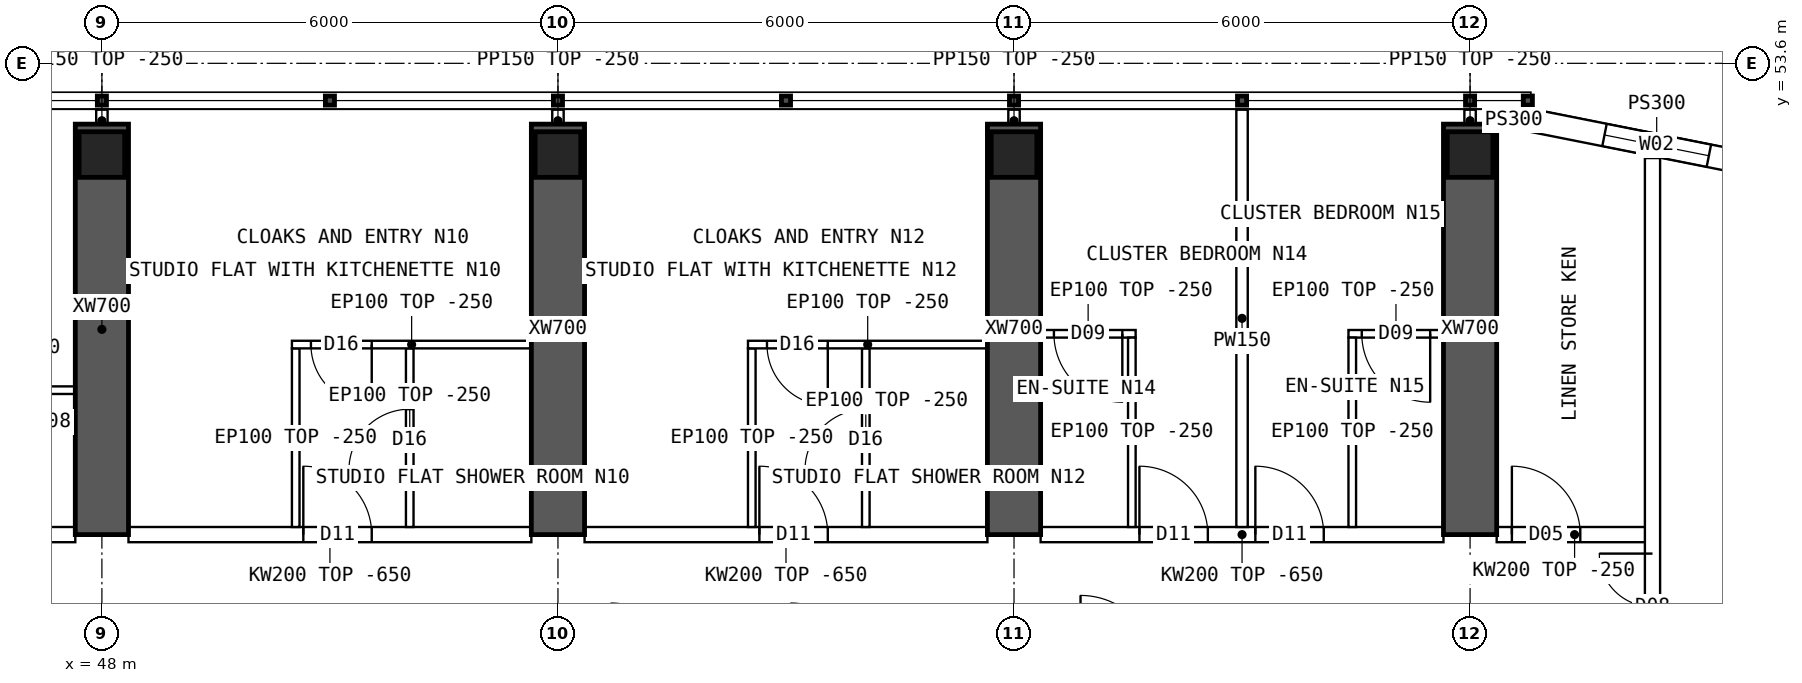
"""IFC4 building model, lengths in metres.
Left out: names, types, materials, properties, quantities, classifications, styles, units other than length and angle.
Written with IfcOpenShell. Run it as: python <this file> out.ifc"""

import sys

from ifc_helpers import new_model, si_unit, direction, frame, frame_2d, origin, origin_2d, place, context, subcontext, project, spatial, polyline, rectangle, hollow_rectangle, outline, extrude, element, fill, save


model = new_model("IFC4")
c1 = context("Model", 3, precision=1e-05, world=origin(), true_north=direction((0.0, 1.0)))
c2 = subcontext(c1, "Body", "Model", "MODEL_VIEW")
j1 = project(units=[si_unit("LENGTHUNIT", "METRE"), si_unit("PLANEANGLEUNIT", "RADIAN")], contexts=[c1])
p1 = place(None, origin())
s1 = spatial("IfcSite", under=j1, at=p1, CompositionType="ELEMENT")
p2 = place(p1, origin())
s2 = spatial("IfcBuilding", under=s1, at=p2, CompositionType="ELEMENT")
p3 = place(p2, frame((0.0, 0.0, 250.3)))
s3 = spatial("IfcBuildingStorey", under=s2, at=p3, CompositionType="ELEMENT", Elevation=250.3)
for number, where, z_axis, x_axis in (
    (1, (48.0, 52.4, 0.0), (0.0, 0.0, 1.0), (1.0, 0.0, 0.0)),
    (2, (54.0, 52.4, 0.0), (0.0, 0.0, 1.0), (1.0, 0.0, 0.0)),
    (3, (60.0, 52.4, 0.0), (0.0, 0.0, 1.0), (1.0, 0.0, 0.0)),
    (4, (66.0, 52.4, 0.0), (0.0, 0.0, 1.0), (1.0, 0.0, 0.0)),
):
    element("IfcColumn", number, at=place(p3, frame(where, z_axis=z_axis, x_axis=x_axis)), inside=s3, PredefinedType="COLUMN", context=c2, shape_type="SweptSolid", body=[
        extrude(hollow_rectangle(XDim=0.6, YDim=0.6, WallThickness=0.06, at=origin_2d()), origin(), (0.0, 0.0, 1.0), 3.75),
    ])
for number, where, z_axis, x_axis in (
    (5, (48.0, 47.4, 0.0), (0.0, 0.0, 1.0), (0.0, 1.0, 0.0)),
    (6, (54.0, 47.4, 0.0), (0.0, 0.0, 1.0), (0.0, 1.0, 0.0)),
    (7, (60.0, 47.4, 0.0), (0.0, 0.0, 1.0), (0.0, 1.0, 0.0)),
    (8, (66.0, 47.4, 0.0), (0.0, 0.0, 1.0), (0.0, 1.0, 0.0)),
):
    element("IfcWall", number, at=place(p3, frame(where, z_axis=z_axis, x_axis=x_axis)), inside=s3, PredefinedType="SHEAR", context=c2, shape_type="SweptSolid", body=[
        extrude(rectangle(XDim=5.4, YDim=0.7, at=frame_2d((2.7, 0.0))), origin(), (0.0, 0.0, 1.0), 3.75),
    ])
p4 = place(p3, frame((70.11, 52.192, 0.0), z_axis=(0.0, 0.0, 1.0), x_axis=(-0.98078325777, 0.195100490205, 0.0)))
e9 = element("IfcWall", 9, at=p4, inside=s3, PredefinedType="SOLIDWALL", context=c2, shape_type="SweptSolid", body=[
    extrude(outline(polyline([(-0.03, -0.15), (3.405, -0.15), (3.345, 0.15), (0.03, 0.15), (-0.03, -0.15)])), origin(), (0.0, 0.0, 1.0), 3.5),
])
p5 = place(p4, frame((0.988, 0.0, 0.9)))
e10 = element("IfcOpeningElement", 10, at=p5, cuts=e9, PredefinedType="OPENING", context=c2, shape_type="SweptSolid", body=[
    extrude(rectangle(XDim=1.4, YDim=1.8, at=frame_2d((0.7, 0.9))), frame((0.0, 0.16, 0.0), z_axis=(0.0, -1.0, 0.0), x_axis=(1.0, 0.0, 0.0)), (0.0, 0.0, 1.0), 0.32),
])
p6 = place(p3, frame((66.8, 52.85, 0.0), z_axis=(0.0, 0.0, 1.0), x_axis=(-1.0, 0.0, 0.0)))
e11 = element("IfcWall", 11, at=p6, inside=s3, PredefinedType="SOLIDWALL", context=c2, shape_type="SweptSolid", body=[
    extrude(rectangle(XDim=0.45, YDim=0.3, at=frame_2d((0.225, 0.0))), origin(), (0.0, 0.0, 1.0), 3.5),
])
p7 = place(p3, frame((42.35, 47.4, 0.0), z_axis=(0.0, 0.0, 1.0), x_axis=(1.0, 0.0, 0.0)))
e12 = element("IfcWall", 12, at=p7, inside=s3, PredefinedType="SOLIDWALL", context=c2, shape_type="SweptSolid", body=[
    extrude(outline(polyline([(0.0, 0.0), (5.3, 0.0), (5.3, 3.1), (0.0, 3.1), (0.0, 0.0)])), frame((0.0, 0.1, 0.0), z_axis=(0.0, -1.0, 0.0), x_axis=(1.0, 0.0, 0.0)), (0.0, 0.0, 1.0), 0.2),
])
p8 = place(p7, frame((0.1, 0.0, 0.0)))
e13 = element("IfcOpeningElement", 13, at=p8, cuts=e12, PredefinedType="OPENING", context=c2, shape_type="SweptSolid", body=[
    extrude(rectangle(XDim=0.9, YDim=2.1, at=frame_2d((0.45, 1.05))), frame((0.0, 0.11, 0.0), z_axis=(0.0, -1.0, 0.0), x_axis=(1.0, 0.0, 0.0)), (0.0, 0.0, 1.0), 0.22),
])
p9 = place(p3, frame((48.35, 47.4, 0.0), z_axis=(0.0, 0.0, 1.0), x_axis=(1.0, 0.0, 0.0)))
e14 = element("IfcWall", 14, at=p9, inside=s3, PredefinedType="SOLIDWALL", context=c2, shape_type="SweptSolid", body=[
    extrude(outline(polyline([(0.0, 0.0), (5.3, 0.0), (5.3, 3.1), (0.0, 3.1), (0.0, 0.0)])), frame((0.0, 0.1, 0.0), z_axis=(0.0, -1.0, 0.0), x_axis=(1.0, 0.0, 0.0)), (0.0, 0.0, 1.0), 0.2),
])
p10 = place(p9, frame((2.3, 0.0, 0.0)))
e15 = element("IfcOpeningElement", 15, at=p10, cuts=e14, PredefinedType="OPENING", context=c2, shape_type="SweptSolid", body=[
    extrude(rectangle(XDim=0.9, YDim=2.1, at=frame_2d((0.45, 1.05))), frame((0.0, 0.11, 0.0), z_axis=(0.0, -1.0, 0.0), x_axis=(1.0, 0.0, 0.0)), (0.0, 0.0, 1.0), 0.22),
])
p11 = place(p3, frame((54.35, 47.4, 0.0), z_axis=(0.0, 0.0, 1.0), x_axis=(1.0, 0.0, 0.0)))
e16 = element("IfcWall", 16, at=p11, inside=s3, PredefinedType="SOLIDWALL", context=c2, shape_type="SweptSolid", body=[
    extrude(outline(polyline([(0.0, 0.0), (5.3, 0.0), (5.3, 3.1), (0.0, 3.1), (0.0, 0.0)])), frame((0.0, 0.1, 0.0), z_axis=(0.0, -1.0, 0.0), x_axis=(1.0, 0.0, 0.0)), (0.0, 0.0, 1.0), 0.2),
])
p12 = place(p11, frame((2.3, 0.0, 0.0)))
e17 = element("IfcOpeningElement", 17, at=p12, cuts=e16, PredefinedType="OPENING", context=c2, shape_type="SweptSolid", body=[
    extrude(rectangle(XDim=0.9, YDim=2.1, at=frame_2d((0.45, 1.05))), frame((0.0, 0.11, 0.0), z_axis=(0.0, -1.0, 0.0), x_axis=(1.0, 0.0, 0.0)), (0.0, 0.0, 1.0), 0.22),
])
p13 = place(p3, frame((60.35, 47.4, 0.0), z_axis=(0.0, 0.0, 1.0), x_axis=(1.0, 0.0, 0.0)))
e18 = element("IfcWall", 18, at=p13, inside=s3, PredefinedType="SOLIDWALL", context=c2, shape_type="SweptSolid", body=[
    extrude(outline(polyline([(0.0, 0.0), (5.3, 0.0), (5.3, 3.1), (0.0, 3.1), (0.0, 0.0)])), frame((0.0, 0.1, 0.0), z_axis=(0.0, -1.0, 0.0), x_axis=(1.0, 0.0, 0.0)), (0.0, 0.0, 1.0), 0.2),
])
p14 = place(p13, frame((1.3, 0.0, 0.0)))
e19 = element("IfcOpeningElement", 19, at=p14, cuts=e18, PredefinedType="OPENING", context=c2, shape_type="SweptSolid", body=[
    extrude(rectangle(XDim=0.9, YDim=2.1, at=frame_2d((0.45, 1.05))), frame((0.0, 0.11, 0.0), z_axis=(0.0, -1.0, 0.0), x_axis=(1.0, 0.0, 0.0)), (0.0, 0.0, 1.0), 0.22),
])
p15 = place(p13, frame((2.825, 0.0, 0.0)))
e20 = element("IfcOpeningElement", 20, at=p15, cuts=e18, PredefinedType="OPENING", context=c2, shape_type="SweptSolid", body=[
    extrude(rectangle(XDim=0.9, YDim=2.1, at=frame_2d((0.45, 1.05))), frame((0.0, 0.11, 0.0), z_axis=(0.0, -1.0, 0.0), x_axis=(1.0, 0.0, 0.0)), (0.0, 0.0, 1.0), 0.22),
])
p16 = place(p3, frame((66.35, 47.4, 0.0), z_axis=(0.0, 0.0, 1.0), x_axis=(1.0, 0.0, 0.0)))
e21 = element("IfcWall", 21, at=p16, inside=s3, PredefinedType="SOLIDWALL", context=c2, shape_type="SweptSolid", body=[
    extrude(rectangle(XDim=2.05, YDim=0.2, at=frame_2d((1.025, 0.0))), origin(), (0.0, 0.0, 1.0), 3.5),
])
p17 = place(p16, frame((0.2, 0.0, 0.0)))
e22 = element("IfcOpeningElement", 22, at=p17, cuts=e21, PredefinedType="OPENING", context=c2, shape_type="SweptSolid", body=[
    extrude(rectangle(XDim=0.9, YDim=2.1, at=frame_2d((0.45, 1.05))), frame((0.0, 0.11, 0.0), z_axis=(0.0, -1.0, 0.0), x_axis=(1.0, 0.0, 0.0)), (0.0, 0.0, 1.0), 0.22),
])
p18 = place(p3, frame((45.1, 49.3, 0.0), z_axis=(0.0, 0.0, 1.0), x_axis=(1.0, 0.0, 0.0)))
e23 = element("IfcWall", 23, at=p18, inside=s3, PredefinedType="PARTITIONING", context=c2, shape_type="SweptSolid", body=[
    extrude(rectangle(XDim=2.55, YDim=0.1, at=frame_2d((1.275, 0.0))), origin(), (0.0, 0.0, 1.0), 3.5),
])
p19 = place(p18, frame((0.825, 0.0, 0.0)))
e24 = element("IfcOpeningElement", 24, at=p19, cuts=e23, PredefinedType="OPENING", context=c2, shape_type="SweptSolid", body=[
    extrude(rectangle(XDim=0.9, YDim=2.1, at=frame_2d((0.45, 1.05))), frame((0.0, 0.06, 0.0), z_axis=(0.0, -1.0, 0.0), x_axis=(1.0, 0.0, 0.0)), (0.0, 0.0, 1.0), 0.12),
])
p20 = place(p3, frame((50.5, 49.9, 0.0), z_axis=(0.0, 0.0, 1.0), x_axis=(1.0, 0.0, 0.0)))
e25 = element("IfcWall", 25, at=p20, inside=s3, PredefinedType="PARTITIONING", context=c2, shape_type="SweptSolid", body=[
    extrude(rectangle(XDim=3.15, YDim=0.1, at=frame_2d((1.575, 0.0))), origin(), (0.0, 0.0, 1.0), 3.5),
])
p21 = place(p20, frame((0.25, 0.0, 0.0)))
e26 = element("IfcOpeningElement", 26, at=p21, cuts=e25, PredefinedType="OPENING", context=c2, shape_type="SweptSolid", body=[
    extrude(rectangle(XDim=0.8, YDim=2.1, at=frame_2d((0.4, 1.05))), frame((0.0, 0.06, 0.0), z_axis=(0.0, -1.0, 0.0), x_axis=(1.0, 0.0, 0.0)), (0.0, 0.0, 1.0), 0.12),
])
p22 = place(p3, frame((50.55, 49.85, 0.0), z_axis=(0.0, 0.0, 1.0), x_axis=(0.0, -1.0, 0.0)))
e27 = element("IfcWall", 27, at=p22, inside=s3, PredefinedType="PARTITIONING", context=c2, shape_type="SweptSolid", body=[
    extrude(outline(polyline([(0.0, 0.0), (2.35, 0.0), (2.35, 3.1), (2.302, 3.1), (2.3, 3.5), (0.0, 3.5), (0.0, 0.0)])), frame((0.0, 0.05, 0.0), z_axis=(0.0, -1.0, 0.0), x_axis=(1.0, 0.0, 0.0)), (0.0, 0.0, 1.0), 0.1),
])
p23 = place(p3, frame((52.05, 49.85, 0.0), z_axis=(0.0, 0.0, 1.0), x_axis=(0.0, -1.0, 0.0)))
e28 = element("IfcWall", 28, at=p23, inside=s3, PredefinedType="PARTITIONING", context=c2, shape_type="SweptSolid", body=[
    extrude(outline(polyline([(0.0, 0.0), (2.35, 0.0), (2.35, 3.1), (2.302, 3.1), (2.3, 3.5), (0.0, 3.5), (0.0, 0.0)])), frame((0.0, 0.05, 0.0), z_axis=(0.0, -1.0, 0.0), x_axis=(1.0, 0.0, 0.0)), (0.0, 0.0, 1.0), 0.1),
])
p24 = place(p23, frame((0.8, 0.0, 0.0)))
e29 = element("IfcOpeningElement", 29, at=p24, cuts=e28, PredefinedType="OPENING", context=c2, shape_type="SweptSolid", body=[
    extrude(rectangle(XDim=0.8, YDim=2.1, at=frame_2d((0.4, 1.05))), frame((0.0, 0.06, 0.0), z_axis=(0.0, -1.0, 0.0), x_axis=(1.0, 0.0, 0.0)), (0.0, 0.0, 1.0), 0.12),
])
p25 = place(p3, frame((56.5, 49.9, 0.0), z_axis=(0.0, 0.0, 1.0), x_axis=(1.0, 0.0, 0.0)))
e30 = element("IfcWall", 30, at=p25, inside=s3, PredefinedType="PARTITIONING", context=c2, shape_type="SweptSolid", body=[
    extrude(rectangle(XDim=3.15, YDim=0.1, at=frame_2d((1.575, 0.0))), origin(), (0.0, 0.0, 1.0), 3.5),
])
p26 = place(p25, frame((0.25, 0.0, 0.0)))
e31 = element("IfcOpeningElement", 31, at=p26, cuts=e30, PredefinedType="OPENING", context=c2, shape_type="SweptSolid", body=[
    extrude(rectangle(XDim=0.8, YDim=2.1, at=frame_2d((0.4, 1.05))), frame((0.0, 0.06, 0.0), z_axis=(0.0, -1.0, 0.0), x_axis=(1.0, 0.0, 0.0)), (0.0, 0.0, 1.0), 0.12),
])
p27 = place(p3, frame((56.55, 49.85, 0.0), z_axis=(0.0, 0.0, 1.0), x_axis=(0.0, -1.0, 0.0)))
e32 = element("IfcWall", 32, at=p27, inside=s3, PredefinedType="PARTITIONING", context=c2, shape_type="SweptSolid", body=[
    extrude(outline(polyline([(0.0, 0.0), (2.35, 0.0), (2.35, 3.1), (2.302, 3.1), (2.3, 3.5), (0.0, 3.5), (0.0, 0.0)])), frame((0.0, 0.05, 0.0), z_axis=(0.0, -1.0, 0.0), x_axis=(1.0, 0.0, 0.0)), (0.0, 0.0, 1.0), 0.1),
])
p28 = place(p3, frame((58.05, 49.85, 0.0), z_axis=(0.0, 0.0, 1.0), x_axis=(0.0, -1.0, 0.0)))
e33 = element("IfcWall", 33, at=p28, inside=s3, PredefinedType="PARTITIONING", context=c2, shape_type="SweptSolid", body=[
    extrude(outline(polyline([(0.0, 0.0), (2.35, 0.0), (2.35, 3.1), (2.302, 3.1), (2.3, 3.5), (0.0, 3.5), (0.0, 0.0)])), frame((0.0, 0.05, 0.0), z_axis=(0.0, -1.0, 0.0), x_axis=(1.0, 0.0, 0.0)), (0.0, 0.0, 1.0), 0.1),
])
p29 = place(p28, frame((0.8, 0.0, 0.0)))
e34 = element("IfcOpeningElement", 34, at=p29, cuts=e33, PredefinedType="OPENING", context=c2, shape_type="SweptSolid", body=[
    extrude(rectangle(XDim=0.8, YDim=2.1, at=frame_2d((0.4, 1.05))), frame((0.0, 0.06, 0.0), z_axis=(0.0, -1.0, 0.0), x_axis=(1.0, 0.0, 0.0)), (0.0, 0.0, 1.0), 0.12),
])
p30 = place(p3, frame((63.0, 52.99, 0.0), z_axis=(0.0, 0.0, 1.0), x_axis=(0.0, -1.0, 0.0)))
e35 = element("IfcWall", 35, at=p30, inside=s3, PredefinedType="PARTITIONING", context=c2, shape_type="SweptSolid", body=[
    extrude(outline(polyline([(0.0, 0.0), (5.49, 0.0), (5.49, 3.1), (5.442, 3.1), (5.44, 3.5), (0.792, 3.5), (0.79, 3.1), (0.392, 3.1), (0.39, 3.5), (0.0, 3.5), (0.0, 0.0)])), frame((0.0, 0.075, 0.0), z_axis=(0.0, -1.0, 0.0), x_axis=(1.0, 0.0, 0.0)), (0.0, 0.0, 1.0), 0.15),
])
p31 = place(p3, frame((60.35, 50.042, 0.0), z_axis=(0.0, 0.0, 1.0), x_axis=(1.0, 0.0, 0.0)))
e36 = element("IfcWall", 36, at=p31, inside=s3, PredefinedType="PARTITIONING", context=c2, shape_type="SweptSolid", body=[
    extrude(rectangle(XDim=1.25, YDim=0.1, at=frame_2d((0.625, 0.0))), origin(), (0.0, 0.0, 1.0), 3.5),
])
p32 = place(p31, frame((0.175, 0.0, 0.0)))
e37 = element("IfcOpeningElement", 37, at=p32, cuts=e36, PredefinedType="OPENING", context=c2, shape_type="SweptSolid", body=[
    extrude(rectangle(XDim=0.9, YDim=2.1, at=frame_2d((0.45, 1.05))), frame((0.0, 0.06, 0.0), z_axis=(0.0, -1.0, 0.0), x_axis=(1.0, 0.0, 0.0)), (0.0, 0.0, 1.0), 0.12),
])
p33 = place(p3, frame((61.55, 49.992, 0.0), z_axis=(0.0, 0.0, 1.0), x_axis=(0.0, -1.0, 0.0)))
e38 = element("IfcWall", 38, at=p33, inside=s3, PredefinedType="PARTITIONING", context=c2, shape_type="SweptSolid", body=[
    extrude(outline(polyline([(0.0, 0.0), (2.492, 0.0), (2.492, 3.1), (2.444, 3.1), (2.442, 3.5), (0.0, 3.5), (0.0, 0.0)])), frame((0.0, 0.05, 0.0), z_axis=(0.0, -1.0, 0.0), x_axis=(1.0, 0.0, 0.0)), (0.0, 0.0, 1.0), 0.1),
])
p34 = place(p3, frame((64.4, 50.042, 0.0), z_axis=(0.0, 0.0, 1.0), x_axis=(1.0, 0.0, 0.0)))
e39 = element("IfcWall", 39, at=p34, inside=s3, PredefinedType="PARTITIONING", context=c2, shape_type="SweptSolid", body=[
    extrude(rectangle(XDim=1.25, YDim=0.1, at=frame_2d((0.625, 0.0))), origin(), (0.0, 0.0, 1.0), 3.5),
])
p35 = place(p34, frame((0.175, 0.0, 0.0)))
e40 = element("IfcOpeningElement", 40, at=p35, cuts=e39, PredefinedType="OPENING", context=c2, shape_type="SweptSolid", body=[
    extrude(rectangle(XDim=0.9, YDim=2.1, at=frame_2d((0.45, 1.05))), frame((0.0, 0.06, 0.0), z_axis=(0.0, -1.0, 0.0), x_axis=(1.0, 0.0, 0.0)), (0.0, 0.0, 1.0), 0.12),
])
p36 = place(p3, frame((64.45, 49.992, 0.0), z_axis=(0.0, 0.0, 1.0), x_axis=(0.0, -1.0, 0.0)))
e41 = element("IfcWall", 41, at=p36, inside=s3, PredefinedType="PARTITIONING", context=c2, shape_type="SweptSolid", body=[
    extrude(outline(polyline([(0.0, 0.0), (2.492, 0.0), (2.492, 3.1), (2.444, 3.1), (2.442, 3.5), (0.0, 3.5), (0.0, 0.0)])), frame((0.0, 0.05, 0.0), z_axis=(0.0, -1.0, 0.0), x_axis=(1.0, 0.0, 0.0)), (0.0, 0.0, 1.0), 0.1),
])
p37 = place(p3, frame((68.4, 11.646, 0.0), z_axis=(0.0, 0.0, 1.0), x_axis=(0.0, 1.0, 0.0)))
e42 = element("IfcWall", 42, at=p37, inside=s3, PredefinedType="SOLIDWALL", context=c2, shape_type="SweptSolid", body=[
    extrude(rectangle(XDim=40.708, YDim=0.2, at=frame_2d((20.354, 0.0))), origin(), (0.0, 0.0, 1.0), 3.5),
])
p38 = place(p37, frame((5.104, 0.0, 0.0)))
e43 = element("IfcOpeningElement", 43, at=p38, cuts=e42, PredefinedType="OPENING", context=c2, shape_type="SweptSolid", body=[
    extrude(rectangle(XDim=1.4, YDim=2.1, at=frame_2d((0.7, 1.05))), frame((0.0, 0.11, 0.0), z_axis=(0.0, -1.0, 0.0), x_axis=(1.0, 0.0, 0.0)), (0.0, 0.0, 1.0), 0.22),
])
p39 = place(p37, frame((34.104, 0.0, 0.0)))
e44 = element("IfcOpeningElement", 44, at=p39, cuts=e42, PredefinedType="OPENING", context=c2, shape_type="SweptSolid", body=[
    extrude(rectangle(XDim=1.4, YDim=2.1, at=frame_2d((0.7, 1.05))), frame((0.0, 0.11, 0.0), z_axis=(0.0, -1.0, 0.0), x_axis=(1.0, 0.0, 0.0)), (0.0, 0.0, 1.0), 0.22),
])
for number, where, z_axis, x_axis in (
    (45, (48.0, 52.7, 0.0), (0.0, 0.0, 1.0), (0.0, 1.0, 0.0)),
    (46, (54.0, 52.7, 0.0), (0.0, 0.0, 1.0), (0.0, 1.0, 0.0)),
    (47, (60.0, 52.7, 0.0), (0.0, 0.0, 1.0), (0.0, 1.0, 0.0)),
    (48, (66.0, 52.7, 0.0), (0.0, 0.0, 1.0), (0.0, 1.0, 0.0)),
):
    element("IfcWall", number, at=place(p3, frame(where, z_axis=z_axis, x_axis=x_axis)), inside=s3, PredefinedType="PARTITIONING", context=c2, shape_type="SweptSolid", body=[
        extrude(rectangle(XDim=0.29, YDim=0.15, at=frame_2d((0.145, 0.0))), origin(), (0.0, 0.0, 1.0), 3.5),
    ])
p40 = place(p5, origin())
e49 = element("IfcWindow", 49, at=p40, inside=s3, PartitioningType="SINGLE_PANEL", PredefinedType="WINDOW", context=c2, shape_type="SweptSolid", body=[
    extrude(rectangle(XDim=1.4, YDim=1.8, at=frame_2d((0.7, 0.9))), frame((0.0, 0.03, 0.0), z_axis=(0.0, -1.0, 0.0), x_axis=(1.0, 0.0, 0.0)), (0.0, 0.0, 1.0), 0.06),
])
fill(e10, e49)
p41 = place(p21, origin())
e50 = element("IfcDoor", 50, at=p41, inside=s3, OperationType="SINGLE_SWING_RIGHT", PredefinedType="DOOR", context=c2, shape_type="SweptSolid", body=[
    extrude(rectangle(XDim=0.8, YDim=2.1, at=frame_2d((0.4, 1.05))), frame((0.0, 0.025, 0.0), z_axis=(0.0, -1.0, 0.0), x_axis=(1.0, 0.0, 0.0)), (0.0, 0.0, 1.0), 0.05),
])
fill(e26, e50)
p42 = place(p24, origin())
e51 = element("IfcDoor", 51, at=p42, inside=s3, OperationType="SINGLE_SWING_RIGHT", PredefinedType="DOOR", context=c2, shape_type="SweptSolid", body=[
    extrude(rectangle(XDim=0.8, YDim=2.1, at=frame_2d((0.4, 1.05))), frame((0.0, 0.025, 0.0), z_axis=(0.0, -1.0, 0.0), x_axis=(1.0, 0.0, 0.0)), (0.0, 0.0, 1.0), 0.05),
])
fill(e29, e51)
p43 = place(p10, origin())
e52 = element("IfcDoor", 52, at=p43, inside=s3, OperationType="SINGLE_SWING_LEFT", PredefinedType="DOOR", context=c2, shape_type="SweptSolid", body=[
    extrude(rectangle(XDim=0.9, YDim=2.1, at=frame_2d((0.45, 1.05))), frame((0.0, 0.025, 0.0), z_axis=(0.0, -1.0, 0.0), x_axis=(1.0, 0.0, 0.0)), (0.0, 0.0, 1.0), 0.05),
])
fill(e15, e52)
p44 = place(p26, origin())
e53 = element("IfcDoor", 53, at=p44, inside=s3, OperationType="SINGLE_SWING_RIGHT", PredefinedType="DOOR", context=c2, shape_type="SweptSolid", body=[
    extrude(rectangle(XDim=0.8, YDim=2.1, at=frame_2d((0.4, 1.05))), frame((0.0, 0.025, 0.0), z_axis=(0.0, -1.0, 0.0), x_axis=(1.0, 0.0, 0.0)), (0.0, 0.0, 1.0), 0.05),
])
fill(e31, e53)
p45 = place(p29, origin())
e54 = element("IfcDoor", 54, at=p45, inside=s3, OperationType="SINGLE_SWING_RIGHT", PredefinedType="DOOR", context=c2, shape_type="SweptSolid", body=[
    extrude(rectangle(XDim=0.8, YDim=2.1, at=frame_2d((0.4, 1.05))), frame((0.0, 0.025, 0.0), z_axis=(0.0, -1.0, 0.0), x_axis=(1.0, 0.0, 0.0)), (0.0, 0.0, 1.0), 0.05),
])
fill(e34, e54)
p46 = place(p12, origin())
e55 = element("IfcDoor", 55, at=p46, inside=s3, OperationType="SINGLE_SWING_LEFT", PredefinedType="DOOR", context=c2, shape_type="SweptSolid", body=[
    extrude(rectangle(XDim=0.9, YDim=2.1, at=frame_2d((0.45, 1.05))), frame((0.0, 0.025, 0.0), z_axis=(0.0, -1.0, 0.0), x_axis=(1.0, 0.0, 0.0)), (0.0, 0.0, 1.0), 0.05),
])
fill(e17, e55)
p47 = place(p32, origin())
e56 = element("IfcDoor", 56, at=p47, inside=s3, OperationType="SINGLE_SWING_RIGHT", PredefinedType="DOOR", context=c2, shape_type="SweptSolid", body=[
    extrude(rectangle(XDim=0.9, YDim=2.1, at=frame_2d((0.45, 1.05))), frame((0.0, 0.025, 0.0), z_axis=(0.0, -1.0, 0.0), x_axis=(1.0, 0.0, 0.0)), (0.0, 0.0, 1.0), 0.05),
])
fill(e37, e56)
p48 = place(p14, origin())
e57 = element("IfcDoor", 57, at=p48, inside=s3, OperationType="SINGLE_SWING_LEFT", PredefinedType="DOOR", context=c2, shape_type="SweptSolid", body=[
    extrude(rectangle(XDim=0.9, YDim=2.1, at=frame_2d((0.45, 1.05))), frame((0.0, 0.025, 0.0), z_axis=(0.0, -1.0, 0.0), x_axis=(1.0, 0.0, 0.0)), (0.0, 0.0, 1.0), 0.05),
])
fill(e19, e57)
p49 = place(p35, origin())
e58 = element("IfcDoor", 58, at=p49, inside=s3, OperationType="SINGLE_SWING_RIGHT", PredefinedType="DOOR", context=c2, shape_type="SweptSolid", body=[
    extrude(rectangle(XDim=0.9, YDim=2.1, at=frame_2d((0.45, 1.05))), frame((0.0, 0.025, 0.0), z_axis=(0.0, -1.0, 0.0), x_axis=(1.0, 0.0, 0.0)), (0.0, 0.0, 1.0), 0.05),
])
fill(e40, e58)
p50 = place(p15, origin())
e59 = element("IfcDoor", 59, at=p50, inside=s3, OperationType="SINGLE_SWING_LEFT", PredefinedType="DOOR", context=c2, shape_type="SweptSolid", body=[
    extrude(rectangle(XDim=0.9, YDim=2.1, at=frame_2d((0.45, 1.05))), frame((0.0, 0.025, 0.0), z_axis=(0.0, -1.0, 0.0), x_axis=(1.0, 0.0, 0.0)), (0.0, 0.0, 1.0), 0.05),
])
fill(e20, e59)
p51 = place(p39, origin())
e60 = element("IfcDoor", 60, at=p51, inside=s3, OperationType="DOUBLE_DOOR_SINGLE_SWING", PredefinedType="DOOR", context=c2, shape_type="SweptSolid", body=[
    extrude(rectangle(XDim=1.4, YDim=2.1, at=frame_2d((0.7, 1.05))), frame((0.0, 0.025, 0.0), z_axis=(0.0, -1.0, 0.0), x_axis=(1.0, 0.0, 0.0)), (0.0, 0.0, 1.0), 0.05),
])
fill(e44, e60)
p52 = place(p17, origin())
e61 = element("IfcDoor", 61, at=p52, inside=s3, OperationType="SINGLE_SWING_LEFT", PredefinedType="DOOR", context=c2, shape_type="SweptSolid", body=[
    extrude(rectangle(XDim=0.9, YDim=2.1, at=frame_2d((0.45, 1.05))), frame((0.0, 0.025, 0.0), z_axis=(0.0, -1.0, 0.0), x_axis=(1.0, 0.0, 0.0)), (0.0, 0.0, 1.0), 0.05),
])
fill(e22, e61)
save(model, sys.argv[1])
